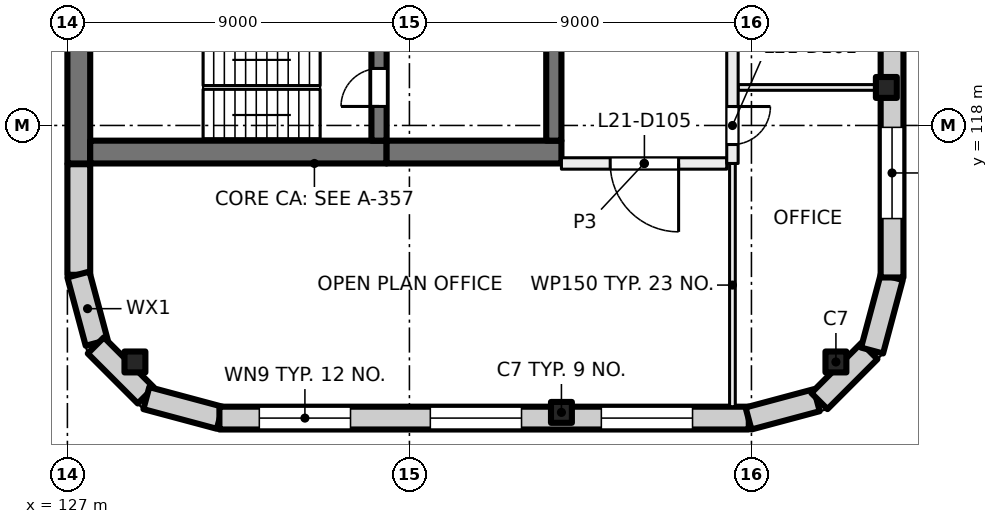
"""IFC4 building model, lengths in metres.
Left out: names, types, materials, properties, quantities, classifications, styles, units other than length and angle.
Written with IfcOpenShell. Run it as: python <this file> out.ifc"""

import sys

from ifc_helpers import new_model, si_unit, direction, frame, frame_2d, origin, origin_2d, place, context, subcontext, project, spatial, rectangle, extrude, element, fill, save


model = new_model("IFC4")
c1 = context("Model", 3, precision=1e-05, world=origin(), true_north=direction((0.0, 1.0)))
c2 = subcontext(c1, "Body", "Model", "MODEL_VIEW")
j1 = project(units=[si_unit("LENGTHUNIT", "METRE"), si_unit("PLANEANGLEUNIT", "RADIAN")], contexts=[c1])
p1 = place(None, origin())
s1 = spatial("IfcSite", under=j1, at=p1, CompositionType="ELEMENT")
p2 = place(p1, origin())
s2 = spatial("IfcBuilding", under=s1, at=p2, CompositionType="ELEMENT")
p3 = place(p2, frame((0.0, 0.0, 93.0)))
s3 = spatial("IfcBuildingStorey", under=s2, at=p3, CompositionType="ELEMENT", Elevation=93.0)
for number, where, z_axis, x_axis in (
    (1, (128.777, 111.777, 0.0), (0.0, 0.0, 1.0), (1.0, 0.0, 0.0)),
    (2, (148.55, 119.0, 0.0), (0.0, 0.0, 1.0), (1.0, 0.0, 0.0)),
    (3, (140.0, 110.45, 0.0), (0.0, 0.0, 1.0), (1.0, 0.0, 0.0)),
    (4, (147.223, 111.777, 0.0), (0.0, 0.0, 1.0), (1.0, 0.0, 0.0)),
):
    element("IfcColumn", number, at=place(p3, frame(where, z_axis=z_axis, x_axis=x_axis)), inside=s3, PredefinedType="COLUMN", context=c2, shape_type="SweptSolid", body=[
        extrude(rectangle(XDim=0.55, YDim=0.55, at=origin_2d()), origin(), (0.0, 0.0, 1.0), 4.0),
    ])
p4 = place(p3, frame((127.3, 117.0, 0.0), z_axis=(0.0, 0.0, 1.0), x_axis=(0.0, 1.0, 0.0)))
e5 = element("IfcWall", 5, at=p4, inside=s3, PredefinedType="SHEAR", context=c2, shape_type="SweptSolid", body=[
    extrude(rectangle(XDim=3.8, YDim=0.6, at=frame_2d((1.9, 0.0))), origin(), (0.0, 0.0, 1.0), 4.0),
])
p5 = place(p3, frame((127.6, 117.3, 0.0), z_axis=(0.0, 0.0, 1.0), x_axis=(1.0, 0.0, 0.0)))
e6 = element("IfcWall", 6, at=p5, inside=s3, PredefinedType="SHEAR", context=c2, shape_type="SweptSolid", body=[
    extrude(rectangle(XDim=7.8, YDim=0.6, at=frame_2d((3.9, 0.0))), origin(), (0.0, 0.0, 1.0), 4.0),
])
p6 = place(p3, frame((135.4, 117.3, 0.0), z_axis=(0.0, 0.0, 1.0), x_axis=(1.0, 0.0, 0.0)))
e7 = element("IfcWall", 7, at=p6, inside=s3, PredefinedType="SHEAR", context=c2, shape_type="SweptSolid", body=[
    extrude(rectangle(XDim=4.6, YDim=0.6, at=frame_2d((2.3, 0.0))), origin(), (0.0, 0.0, 1.0), 4.0),
])
p7 = place(p3, frame((135.2, 117.6, 0.0), z_axis=(0.0, 0.0, 1.0), x_axis=(0.0, 1.0, 0.0)))
e8 = element("IfcWall", 8, at=p7, inside=s3, PredefinedType="SHEAR", context=c2, shape_type="SweptSolid", body=[
    extrude(rectangle(XDim=2.8, YDim=0.4, at=frame_2d((1.4, 0.0))), origin(), (0.0, 0.0, 1.0), 4.0),
])
p8 = place(p7, frame((0.9, 0.0, 0.0)))
e9 = element("IfcOpeningElement", 9, at=p8, cuts=e8, PredefinedType="OPENING", context=c2, shape_type="SweptSolid", body=[
    extrude(rectangle(XDim=1.0, YDim=2.1, at=frame_2d((0.5, 1.05))), frame((0.0, 0.21, 0.0), z_axis=(0.0, -1.0, 0.0), x_axis=(1.0, 0.0, 0.0)), (0.0, 0.0, 1.0), 0.42),
])
p9 = place(p3, frame((139.8, 117.6, 0.0), z_axis=(0.0, 0.0, 1.0), x_axis=(0.0, 1.0, 0.0)))
e10 = element("IfcWall", 10, at=p9, inside=s3, PredefinedType="SHEAR", context=c2, shape_type="SweptSolid", body=[
    extrude(rectangle(XDim=8.6, YDim=0.4, at=frame_2d((4.3, 0.0))), origin(), (0.0, 0.0, 1.0), 4.0),
])
p10 = place(p3, frame((127.3, 114.07, 0.0), z_axis=(0.0, 0.0, 1.0), x_axis=(0.0, 1.0, 0.0)))
e11 = element("IfcWall", 11, at=p10, inside=s3, PredefinedType="SOLIDWALL", context=c2, shape_type="SweptSolid", body=[
    extrude(rectangle(XDim=2.91, YDim=0.6, at=frame_2d((1.455, 0.0))), origin(), (0.0, 0.0, 1.0), 3.625),
])
for number, where, z_axis, x_axis in (
    (12, (127.771, 112.281, 0.0), (0.0, 0.0, 1.0), (-0.259, 0.966, 0.0)),
    (13, (129.064, 110.896, 0.0), (0.0, 0.0, 1.0), (-0.707, 0.707, 0.0)),
):
    element("IfcWall", number, at=place(p3, frame(where, z_axis=z_axis, x_axis=x_axis)), inside=s3, PredefinedType="SOLIDWALL", context=c2, shape_type="SweptSolid", body=[
        extrude(rectangle(XDim=1.861, YDim=0.6, at=frame_2d((0.93, 0.0))), origin(), (0.0, 0.0, 1.0), 3.625),
    ])
p11 = place(p3, frame((131.01, 110.308, 0.0), z_axis=(0.0, 0.0, 1.0), x_axis=(-0.965920269068, 0.258839784042, 0.0)))
e14 = element("IfcWall", 14, at=p11, inside=s3, PredefinedType="SOLIDWALL", context=c2, shape_type="SweptSolid", body=[
    extrude(rectangle(XDim=2.0, YDim=0.6, at=frame_2d((1.0, 0.0))), origin(), (0.0, 0.0, 1.0), 3.625),
])
p12 = place(p3, frame((144.93, 110.3, 0.0), z_axis=(0.0, 0.0, 1.0), x_axis=(-1.0, 0.0, 0.0)))
e15 = element("IfcWall", 15, at=p12, inside=s3, PredefinedType="SOLIDWALL", context=c2, shape_type="SweptSolid", body=[
    extrude(rectangle(XDim=13.93, YDim=0.6, at=frame_2d((6.965, 0.0))), origin(), (0.0, 0.0, 1.0), 3.625),
])
p13 = place(p12, frame((1.48, 0.0, 0.9)))
e16 = element("IfcOpeningElement", 16, at=p13, cuts=e15, PredefinedType="OPENING", context=c2, shape_type="SweptSolid", body=[
    extrude(rectangle(XDim=2.4, YDim=2.4, at=frame_2d((1.2, 1.2))), frame((0.0, 0.31, 0.0), z_axis=(0.0, -1.0, 0.0), x_axis=(1.0, 0.0, 0.0)), (0.0, 0.0, 1.0), 0.62),
])
p14 = place(p12, frame((5.98, 0.0, 0.9)))
e17 = element("IfcOpeningElement", 17, at=p14, cuts=e15, PredefinedType="OPENING", context=c2, shape_type="SweptSolid", body=[
    extrude(rectangle(XDim=2.4, YDim=2.4, at=frame_2d((1.2, 1.2))), frame((0.0, 0.31, 0.0), z_axis=(0.0, -1.0, 0.0), x_axis=(1.0, 0.0, 0.0)), (0.0, 0.0, 1.0), 0.62),
])
p15 = place(p12, frame((10.48, 0.0, 0.9)))
e18 = element("IfcOpeningElement", 18, at=p15, cuts=e15, PredefinedType="OPENING", context=c2, shape_type="SweptSolid", body=[
    extrude(rectangle(XDim=2.4, YDim=2.4, at=frame_2d((1.2, 1.2))), frame((0.0, 0.31, 0.0), z_axis=(0.0, -1.0, 0.0), x_axis=(1.0, 0.0, 0.0)), (0.0, 0.0, 1.0), 0.62),
])
for number, where, z_axis, x_axis in (
    (19, (146.719, 110.771, 0.0), (0.0, 0.0, 1.0), (-0.966, -0.259, 0.0)),
    (20, (148.104, 112.064, 0.0), (0.0, 0.0, 1.0), (-0.707, -0.707, 0.0)),
):
    element("IfcWall", number, at=place(p3, frame(where, z_axis=z_axis, x_axis=x_axis)), inside=s3, PredefinedType="SOLIDWALL", context=c2, shape_type="SweptSolid", body=[
        extrude(rectangle(XDim=1.861, YDim=0.6, at=frame_2d((0.93, 0.0))), origin(), (0.0, 0.0, 1.0), 3.625),
    ])
p16 = place(p3, frame((148.692, 114.01, 0.0), z_axis=(0.0, 0.0, 1.0), x_axis=(-0.258839784042, -0.965920269068, 0.0)))
e21 = element("IfcWall", 21, at=p16, inside=s3, PredefinedType="SOLIDWALL", context=c2, shape_type="SweptSolid", body=[
    extrude(rectangle(XDim=2.0, YDim=0.6, at=frame_2d((1.0, 0.0))), origin(), (0.0, 0.0, 1.0), 3.625),
])
p17 = place(p3, frame((148.7, 141.93, 0.0), z_axis=(0.0, 0.0, 1.0), x_axis=(0.0, -1.0, 0.0)))
e22 = element("IfcWall", 22, at=p17, inside=s3, PredefinedType="SOLIDWALL", context=c2, shape_type="SweptSolid", body=[
    extrude(rectangle(XDim=27.93, YDim=0.6, at=frame_2d((13.965, 0.0))), origin(), (0.0, 0.0, 1.0), 3.625),
])
p18 = place(p17, frame((1.48, 0.0, 0.9)))
e23 = element("IfcOpeningElement", 23, at=p18, cuts=e22, PredefinedType="OPENING", context=c2, shape_type="SweptSolid", body=[
    extrude(rectangle(XDim=2.4, YDim=2.4, at=frame_2d((1.2, 1.2))), frame((0.0, 0.31, 0.0), z_axis=(0.0, -1.0, 0.0), x_axis=(1.0, 0.0, 0.0)), (0.0, 0.0, 1.0), 0.62),
])
p19 = place(p17, frame((5.98, 0.0, 0.9)))
e24 = element("IfcOpeningElement", 24, at=p19, cuts=e22, PredefinedType="OPENING", context=c2, shape_type="SweptSolid", body=[
    extrude(rectangle(XDim=2.4, YDim=2.4, at=frame_2d((1.2, 1.2))), frame((0.0, 0.31, 0.0), z_axis=(0.0, -1.0, 0.0), x_axis=(1.0, 0.0, 0.0)), (0.0, 0.0, 1.0), 0.62),
])
p20 = place(p17, frame((10.48, 0.0, 0.9)))
e25 = element("IfcOpeningElement", 25, at=p20, cuts=e22, PredefinedType="OPENING", context=c2, shape_type="SweptSolid", body=[
    extrude(rectangle(XDim=2.4, YDim=2.4, at=frame_2d((1.2, 1.2))), frame((0.0, 0.31, 0.0), z_axis=(0.0, -1.0, 0.0), x_axis=(1.0, 0.0, 0.0)), (0.0, 0.0, 1.0), 0.62),
])
p21 = place(p17, frame((14.98, 0.0, 0.9)))
e26 = element("IfcOpeningElement", 26, at=p21, cuts=e22, PredefinedType="OPENING", context=c2, shape_type="SweptSolid", body=[
    extrude(rectangle(XDim=2.4, YDim=2.4, at=frame_2d((1.2, 1.2))), frame((0.0, 0.31, 0.0), z_axis=(0.0, -1.0, 0.0), x_axis=(1.0, 0.0, 0.0)), (0.0, 0.0, 1.0), 0.62),
])
p22 = place(p17, frame((19.48, 0.0, 0.9)))
e27 = element("IfcOpeningElement", 27, at=p22, cuts=e22, PredefinedType="OPENING", context=c2, shape_type="SweptSolid", body=[
    extrude(rectangle(XDim=2.4, YDim=2.4, at=frame_2d((1.2, 1.2))), frame((0.0, 0.31, 0.0), z_axis=(0.0, -1.0, 0.0), x_axis=(1.0, 0.0, 0.0)), (0.0, 0.0, 1.0), 0.62),
])
p23 = place(p17, frame((23.98, 0.0, 0.9)))
e28 = element("IfcOpeningElement", 28, at=p23, cuts=e22, PredefinedType="OPENING", context=c2, shape_type="SweptSolid", body=[
    extrude(rectangle(XDim=2.4, YDim=2.4, at=frame_2d((1.2, 1.2))), frame((0.0, 0.31, 0.0), z_axis=(0.0, -1.0, 0.0), x_axis=(1.0, 0.0, 0.0)), (0.0, 0.0, 1.0), 0.62),
])
p24 = place(p3, frame((144.35, 117.0, 0.0), z_axis=(0.0, 0.0, 1.0), x_axis=(-1.0, 0.0, 0.0)))
e29 = element("IfcWall", 29, at=p24, inside=s3, PredefinedType="PARTITIONING", context=c2, shape_type="SweptSolid", body=[
    extrude(rectangle(XDim=4.35, YDim=0.3, at=frame_2d((2.175, 0.0))), origin(), (0.0, 0.0, 1.0), 3.625),
])
p25 = place(p24, frame((1.267, 0.0, 0.0)))
e30 = element("IfcOpeningElement", 30, at=p25, cuts=e29, PredefinedType="OPENING", context=c2, shape_type="SweptSolid", body=[
    extrude(rectangle(XDim=1.8, YDim=2.1, at=frame_2d((0.9, 1.05))), frame((0.0, 0.16, 0.0), z_axis=(0.0, -1.0, 0.0), x_axis=(1.0, 0.0, 0.0)), (0.0, 0.0, 1.0), 0.32),
])
p26 = place(p3, frame((144.5, 117.0, 0.0), z_axis=(0.0, 0.0, 1.0), x_axis=(0.0, -1.0, 0.0)))
e31 = element("IfcWall", 31, at=p26, inside=s3, PredefinedType="PARTITIONING", context=c2, shape_type="SweptSolid", body=[
    extrude(rectangle(XDim=6.4, YDim=0.15, at=frame_2d((3.2, 0.0))), origin(), (0.0, 0.0, 1.0), 3.625),
])
p27 = place(p3, frame((144.65, 119.0, 0.0), z_axis=(0.0, 0.0, 1.0), x_axis=(1.0, 0.0, 0.0)))
e32 = element("IfcWall", 32, at=p27, inside=s3, PredefinedType="PARTITIONING", context=c2, shape_type="SweptSolid", body=[
    extrude(rectangle(XDim=3.75, YDim=0.15, at=frame_2d((1.875, 0.0))), origin(), (0.0, 0.0, 1.0), 3.625),
])
p28 = place(p3, frame((144.5, 139.0, 0.0), z_axis=(0.0, 0.0, 1.0), x_axis=(0.0, -1.0, 0.0)))
e33 = element("IfcWall", 33, at=p28, inside=s3, PredefinedType="PARTITIONING", context=c2, shape_type="SweptSolid", body=[
    extrude(rectangle(XDim=22.0, YDim=0.3, at=frame_2d((11.0, 0.0))), origin(), (0.0, 0.0, 1.0), 3.625),
])
p29 = place(p28, frame((20.501, 0.0, 0.0)))
e34 = element("IfcOpeningElement", 34, at=p29, cuts=e33, PredefinedType="OPENING", context=c2, shape_type="SweptSolid", body=[
    extrude(rectangle(XDim=1.0, YDim=2.1, at=frame_2d((0.5, 1.05))), frame((0.0, 0.16, 0.0), z_axis=(0.0, -1.0, 0.0), x_axis=(1.0, 0.0, 0.0)), (0.0, 0.0, 1.0), 0.32),
])
p30 = place(p28, frame((15.0, 0.0, 0.0)))
e35 = element("IfcOpeningElement", 35, at=p30, cuts=e33, PredefinedType="OPENING", context=c2, shape_type="SweptSolid", body=[
    extrude(rectangle(XDim=1.0, YDim=2.1, at=frame_2d((0.5, 1.05))), frame((0.0, 0.16, 0.0), z_axis=(0.0, -1.0, 0.0), x_axis=(1.0, 0.0, 0.0)), (0.0, 0.0, 1.0), 0.32),
])
p31 = place(p28, frame((6.0, 0.0, 0.0)))
e36 = element("IfcOpeningElement", 36, at=p31, cuts=e33, PredefinedType="OPENING", context=c2, shape_type="SweptSolid", body=[
    extrude(rectangle(XDim=1.0, YDim=2.1, at=frame_2d((0.5, 1.05))), frame((0.0, 0.16, 0.0), z_axis=(0.0, -1.0, 0.0), x_axis=(1.0, 0.0, 0.0)), (0.0, 0.0, 1.0), 0.32),
])
p32 = place(p28, frame((0.499, 0.0, 0.0)))
e37 = element("IfcOpeningElement", 37, at=p32, cuts=e33, PredefinedType="OPENING", context=c2, shape_type="SweptSolid", body=[
    extrude(rectangle(XDim=1.0, YDim=2.1, at=frame_2d((0.5, 1.05))), frame((0.0, 0.16, 0.0), z_axis=(0.0, -1.0, 0.0), x_axis=(1.0, 0.0, 0.0)), (0.0, 0.0, 1.0), 0.32),
])
p33 = place(p13, origin())
e38 = element("IfcWindow", 38, at=p33, inside=s3, PartitioningType="SINGLE_PANEL", PredefinedType="WINDOW", context=c2, shape_type="SweptSolid", body=[
    extrude(rectangle(XDim=2.4, YDim=2.4, at=frame_2d((1.2, 1.2))), frame((0.0, 0.03, 0.0), z_axis=(0.0, -1.0, 0.0), x_axis=(1.0, 0.0, 0.0)), (0.0, 0.0, 1.0), 0.06),
])
fill(e16, e38)
p34 = place(p14, origin())
e39 = element("IfcWindow", 39, at=p34, inside=s3, PartitioningType="SINGLE_PANEL", PredefinedType="WINDOW", context=c2, shape_type="SweptSolid", body=[
    extrude(rectangle(XDim=2.4, YDim=2.4, at=frame_2d((1.2, 1.2))), frame((0.0, 0.03, 0.0), z_axis=(0.0, -1.0, 0.0), x_axis=(1.0, 0.0, 0.0)), (0.0, 0.0, 1.0), 0.06),
])
fill(e17, e39)
p35 = place(p15, origin())
e40 = element("IfcWindow", 40, at=p35, inside=s3, PartitioningType="SINGLE_PANEL", PredefinedType="WINDOW", context=c2, shape_type="SweptSolid", body=[
    extrude(rectangle(XDim=2.4, YDim=2.4, at=frame_2d((1.2, 1.2))), frame((0.0, 0.03, 0.0), z_axis=(0.0, -1.0, 0.0), x_axis=(1.0, 0.0, 0.0)), (0.0, 0.0, 1.0), 0.06),
])
fill(e18, e40)
p36 = place(p23, origin())
e41 = element("IfcWindow", 41, at=p36, inside=s3, PartitioningType="SINGLE_PANEL", PredefinedType="WINDOW", context=c2, shape_type="SweptSolid", body=[
    extrude(rectangle(XDim=2.4, YDim=2.4, at=frame_2d((1.2, 1.2))), frame((0.0, 0.03, 0.0), z_axis=(0.0, -1.0, 0.0), x_axis=(1.0, 0.0, 0.0)), (0.0, 0.0, 1.0), 0.06),
])
fill(e28, e41)
p37 = place(p8, origin())
e42 = element("IfcDoor", 42, at=p37, inside=s3, OperationType="SINGLE_SWING_RIGHT", PredefinedType="DOOR", context=c2, shape_type="SweptSolid", body=[
    extrude(rectangle(XDim=1.0, YDim=2.1, at=frame_2d((0.5, 1.05))), frame((0.0, 0.025, 0.0), z_axis=(0.0, -1.0, 0.0), x_axis=(1.0, 0.0, 0.0)), (0.0, 0.0, 1.0), 0.05),
])
fill(e9, e42)
p38 = place(p29, origin())
e43 = element("IfcDoor", 43, at=p38, inside=s3, OperationType="SINGLE_SWING_LEFT", PredefinedType="DOOR", context=c2, shape_type="SweptSolid", body=[
    extrude(rectangle(XDim=1.0, YDim=2.1, at=frame_2d((0.5, 1.05))), frame((0.0, 0.025, 0.0), z_axis=(0.0, -1.0, 0.0), x_axis=(1.0, 0.0, 0.0)), (0.0, 0.0, 1.0), 0.05),
])
fill(e34, e43)
p39 = place(p25, origin())
e44 = element("IfcDoor", 44, at=p39, inside=s3, OperationType="DOUBLE_DOOR_SINGLE_SWING", PredefinedType="DOOR", context=c2, shape_type="SweptSolid", body=[
    extrude(rectangle(XDim=1.8, YDim=2.1, at=frame_2d((0.9, 1.05))), frame((0.0, 0.025, 0.0), z_axis=(0.0, -1.0, 0.0), x_axis=(1.0, 0.0, 0.0)), (0.0, 0.0, 1.0), 0.05),
])
fill(e30, e44)
save(model, sys.argv[1])
